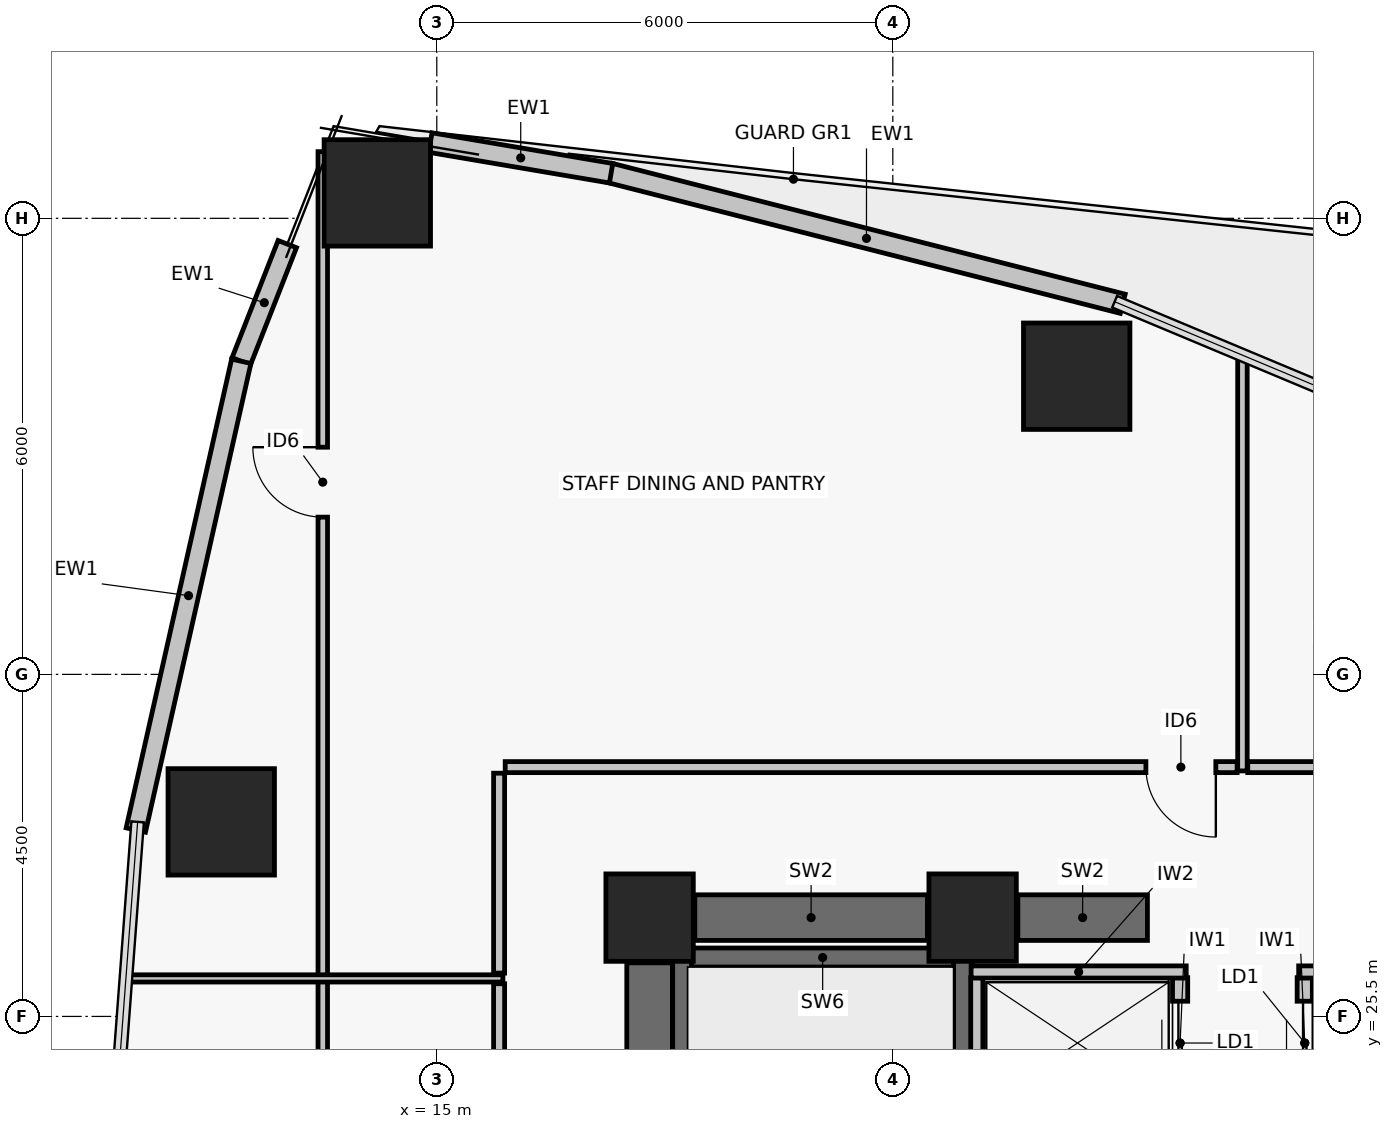
"""IFC4 building model, lengths in metres.
Left out: names, types, materials, properties, quantities, classifications, styles, units other than length and angle.
Written with IfcOpenShell. Run it as: python <this file> out.ifc"""

import sys

from ifc_helpers import new_model, si_unit, direction, frame, frame_2d, origin, origin_2d, place, context, subcontext, project, spatial, rectangle, hollow_rectangle, extrude, element, fill, save


model = new_model("IFC4")
c1 = context("Model", 3, precision=1e-05, world=origin(), true_north=direction((0.0, 1.0)))
c2 = subcontext(c1, "Body", "Model", "MODEL_VIEW")
j1 = project(units=[si_unit("LENGTHUNIT", "METRE"), si_unit("PLANEANGLEUNIT", "RADIAN")], contexts=[c1])
p1 = place(None, origin())
s1 = spatial("IfcSite", under=j1, at=p1, CompositionType="ELEMENT")
p2 = place(p1, origin())
s2 = spatial("IfcBuilding", under=s1, at=p2, CompositionType="ELEMENT")
p3 = place(p2, frame((0.0, 0.0, 68.52)))
s3 = spatial("IfcBuildingStorey", under=s2, at=p3, CompositionType="ELEMENT", Elevation=68.52)
for number, where, z_axis, x_axis in (
    (1, (17.8, 26.8, 0.0), (0.0, 0.0, 1.0), (1.0, 0.0, 0.0)),
    (2, (22.05, 26.8, 0.0), (0.0, 0.0, 1.0), (1.0, 0.0, 0.0)),
):
    element("IfcColumn", number, at=place(p3, frame(where, z_axis=z_axis, x_axis=x_axis)), inside=s3, PredefinedType="COLUMN", context=c2, shape_type="SweptSolid", body=[
        extrude(rectangle(XDim=1.15, YDim=1.15, at=origin_2d()), origin(), (0.0, 0.0, 1.0), 3.72),
    ])
p4 = place(p3, frame((18.395, 26.8, 0.0), z_axis=(0.0, 0.0, 1.0), x_axis=(1.0, 0.0, 0.0)))
e3 = element("IfcWall", 3, at=p4, inside=s3, PredefinedType="SHEAR", context=c2, shape_type="SweptSolid", body=[
    extrude(rectangle(XDim=3.06, YDim=0.6, at=frame_2d((1.53, 0.0))), origin(), (0.0, 0.0, 1.0), 3.47),
])
p5 = place(p3, frame((22.645, 26.8, 0.0), z_axis=(0.0, 0.0, 1.0), x_axis=(1.0, 0.0, 0.0)))
e4 = element("IfcWall", 4, at=p5, inside=s3, PredefinedType="SHEAR", context=c2, shape_type="SweptSolid", body=[
    extrude(rectangle(XDim=1.705, YDim=0.6, at=frame_2d((0.853, 0.0))), origin(), (0.0, 0.0, 1.0), 3.47),
])
p6 = place(p3, frame((17.8, 17.795, 0.0), z_axis=(0.0, 0.0, 1.0), x_axis=(0.0, 1.0, 0.0)))
e5 = element("IfcWall", 5, at=p6, inside=s3, PredefinedType="SHEAR", context=c2, shape_type="SweptSolid", body=[
    extrude(rectangle(XDim=8.41, YDim=0.6, at=frame_2d((4.205, 0.0))), origin(), (0.0, 0.0, 1.0), 3.47),
])
p7 = place(p3, frame((18.229, 17.6, 0.0), z_axis=(0.0, 0.0, 1.0), x_axis=(0.0, 1.0, 0.0)))
e6 = element("IfcWall", 6, at=p7, inside=s3, PredefinedType="SHEAR", context=c2, shape_type="SweptSolid", body=[
    extrude(rectangle(XDim=8.8, YDim=0.25, at=frame_2d((4.4, 0.0))), origin(), (0.0, 0.0, 1.0), 3.47),
])
p8 = place(p3, frame((21.925, 17.6, 0.0), z_axis=(0.0, 0.0, 1.0), x_axis=(0.0, 1.0, 0.0)))
e7 = element("IfcWall", 7, at=p8, inside=s3, PredefinedType="SHEAR", context=c2, shape_type="SweptSolid", body=[
    extrude(rectangle(XDim=8.8, YDim=0.25, at=frame_2d((4.4, 0.0))), origin(), (0.0, 0.0, 1.0), 3.47),
])
p9 = place(p8, frame((0.35, 0.0, 0.0)))
e8 = element("IfcOpeningElement", 8, at=p9, cuts=e7, PredefinedType="OPENING", context=c2, shape_type="SweptSolid", body=[
    extrude(rectangle(XDim=1.05, YDim=2.08, at=frame_2d((0.525, 1.04))), frame((0.0, 0.135, 0.0), z_axis=(0.0, -1.0, 0.0), x_axis=(1.0, 0.0, 0.0)), (0.0, 0.0, 1.0), 0.27),
])
p10 = place(p3, frame((18.354, 26.275, 0.0), z_axis=(0.0, 0.0, 1.0), x_axis=(1.0, 0.0, 0.0)))
e9 = element("IfcWall", 9, at=p10, inside=s3, PredefinedType="SHEAR", context=c2, shape_type="SweptSolid", body=[
    extrude(rectangle(XDim=3.446, YDim=0.25, at=frame_2d((1.723, 0.0))), origin(), (0.0, 0.0, 1.0), 3.47),
])
for number, where, z_axis, x_axis in (
    (10, (23.419, 33.923, 0.0), (0.0, 0.0, 1.0), (1.0, 0.0, 0.0)),
    (11, (14.218, 36.334, 0.0), (0.0, 0.0, 1.0), (1.0, 0.0, 0.0)),
    (12, (12.164, 28.06, 0.0), (0.0, 0.0, 1.0), (1.0, 0.0, 0.0)),
):
    element("IfcColumn", number, at=place(p3, frame(where, z_axis=z_axis, x_axis=x_axis)), inside=s3, PredefinedType="COLUMN", context=c2, shape_type="SweptSolid", body=[
        extrude(hollow_rectangle(XDim=1.4, YDim=1.4, WallThickness=0.055, at=origin_2d()), origin(), (0.0, 0.0, 1.0), 3.72),
    ])
p11 = place(p3, frame((17.282, 36.596, 0.0), z_axis=(0.0, 0.0, 1.0), x_axis=(0.968977974408, -0.247147092057, 0.0)))
e13 = element("IfcWall", 13, at=p11, inside=s3, PredefinedType="PARTITIONING", context=c2, shape_type="SweptSolid", body=[
    extrude(rectangle(XDim=6.959, YDim=0.26, at=frame_2d((3.479, 0.0))), origin(), (0.0, 0.0, 1.0), 3.47),
])
p12 = place(p3, frame((14.915, 36.997, 0.0), z_axis=(0.0, 0.0, 1.0), x_axis=(0.985905469923, -0.167303330437, 0.0)))
e14 = element("IfcWall", 14, at=p12, inside=s3, PredefinedType="PARTITIONING", context=c2, shape_type="SweptSolid", body=[
    extrude(rectangle(XDim=2.412, YDim=0.26, at=frame_2d((1.206, 0.0))), origin(), (0.0, 0.0, 1.0), 3.47),
])
p13 = place(p3, frame((12.427, 34.119, 0.0), z_axis=(0.0, 0.0, 1.0), x_axis=(0.365666052462, 0.930746119023, 0.0)))
e15 = element("IfcWall", 15, at=p13, inside=s3, PredefinedType="PARTITIONING", context=c2, shape_type="SweptSolid", body=[
    extrude(rectangle(XDim=1.656, YDim=0.26, at=frame_2d((0.828, 0.0))), origin(), (0.0, 0.0, 1.0), 3.47),
])
p14 = place(p3, frame((11.04, 27.952, 0.0), z_axis=(0.0, 0.0, 1.0), x_axis=(0.219502085231, 0.975612030768, 0.0)))
e16 = element("IfcWall", 16, at=p14, inside=s3, PredefinedType="PARTITIONING", context=c2, shape_type="SweptSolid", body=[
    extrude(rectangle(XDim=6.321, YDim=0.26, at=frame_2d((3.16, 0.0))), origin(), (0.0, 0.0, 1.0), 3.47),
])
p15 = place(p3, frame((24.78, 24.29, 0.0), z_axis=(0.0, 0.0, 1.0), x_axis=(0.0, 1.0, 0.0)))
e17 = element("IfcWall", 17, at=p15, inside=s3, PredefinedType="PARTITIONING", context=c2, shape_type="SweptSolid", body=[
    extrude(rectangle(XDim=1.72, YDim=0.2, at=frame_2d((0.86, 0.0))), origin(), (0.0, 0.0, 1.0), 3.47),
])
p16 = place(p15, frame((0.31, 0.0, 0.0)))
e18 = element("IfcOpeningElement", 18, at=p16, cuts=e17, PredefinedType="OPENING", context=c2, shape_type="SweptSolid", body=[
    extrude(rectangle(XDim=1.1, YDim=2.08, at=frame_2d((0.55, 1.04))), frame((0.0, 0.11, 0.0), z_axis=(0.0, -1.0, 0.0), x_axis=(1.0, 0.0, 0.0)), (0.0, 0.0, 1.0), 0.22),
])
p17 = place(p3, frame((26.42, 24.29, 0.0), z_axis=(0.0, 0.0, 1.0), x_axis=(0.0, 1.0, 0.0)))
e19 = element("IfcWall", 19, at=p17, inside=s3, PredefinedType="PARTITIONING", context=c2, shape_type="SweptSolid", body=[
    extrude(rectangle(XDim=1.72, YDim=0.2, at=frame_2d((0.86, 0.0))), origin(), (0.0, 0.0, 1.0), 3.47),
])
p18 = place(p17, frame((0.31, 0.0, 0.0)))
e20 = element("IfcOpeningElement", 20, at=p18, cuts=e19, PredefinedType="OPENING", context=c2, shape_type="SweptSolid", body=[
    extrude(rectangle(XDim=1.1, YDim=2.08, at=frame_2d((0.55, 1.04))), frame((0.0, 0.11, 0.0), z_axis=(0.0, -1.0, 0.0), x_axis=(1.0, 0.0, 0.0)), (0.0, 0.0, 1.0), 0.22),
])
p19 = place(p3, frame((22.105, 20.56, 0.0), z_axis=(0.0, 0.0, 1.0), x_axis=(0.0, 1.0, 0.0)))
e21 = element("IfcWall", 21, at=p19, inside=s3, PredefinedType="PARTITIONING", context=c2, shape_type="SweptSolid", body=[
    extrude(rectangle(XDim=5.45, YDim=0.16, at=frame_2d((2.725, 0.0))), origin(), (0.0, 0.0, 1.0), 3.47),
])
p20 = place(p3, frame((22.03, 26.085, 0.0), z_axis=(0.0, 0.0, 1.0), x_axis=(1.0, 0.0, 0.0)))
e22 = element("IfcWall", 22, at=p20, inside=s3, PredefinedType="PARTITIONING", context=c2, shape_type="SweptSolid", body=[
    extrude(rectangle(XDim=2.83, YDim=0.16, at=frame_2d((1.415, 0.0))), origin(), (0.0, 0.0, 1.0), 3.47),
])
p21 = place(p3, frame((26.34, 26.085, 0.0), z_axis=(0.0, 0.0, 1.0), x_axis=(1.0, 0.0, 0.0)))
e23 = element("IfcWall", 23, at=p21, inside=s3, PredefinedType="PARTITIONING", context=c2, shape_type="SweptSolid", body=[
    extrude(rectangle(XDim=2.83, YDim=0.16, at=frame_2d((1.415, 0.0))), origin(), (0.0, 0.0, 1.0), 3.47),
])
p22 = place(p3, frame((32.297, 28.78, 0.0), z_axis=(0.0, 0.0, 1.0), x_axis=(-1.0, 0.0, 0.0)))
e24 = element("IfcWall", 24, at=p22, inside=s3, PredefinedType="PARTITIONING", context=c2, shape_type="SweptSolid", body=[
    extrude(rectangle(XDim=6.627, YDim=0.145, at=frame_2d((3.314, 0.0))), origin(), (0.0, 0.0, 1.0), 3.47),
])
p23 = place(p3, frame((25.53, 28.78, 0.0), z_axis=(0.0, 0.0, 1.0), x_axis=(-1.0, 0.0, 0.0)))
e25 = element("IfcWall", 25, at=p23, inside=s3, PredefinedType="PARTITIONING", context=c2, shape_type="SweptSolid", body=[
    extrude(rectangle(XDim=9.63, YDim=0.145, at=frame_2d((4.815, 0.0))), origin(), (0.0, 0.0, 1.0), 2.2),
])
p24 = place(p23, frame((0.28, 0.0, 0.0)))
e26 = element("IfcOpeningElement", 26, at=p24, cuts=e25, PredefinedType="OPENING", context=c2, shape_type="SweptSolid", body=[
    extrude(rectangle(XDim=0.92, YDim=2.05, at=frame_2d((0.46, 1.025))), frame((0.0, 0.083, 0.0), z_axis=(0.0, -1.0, 0.0), x_axis=(1.0, 0.0, 0.0)), (0.0, 0.0, 1.0), 0.165),
])
p25 = place(p3, frame((15.82, 28.7, 0.0), z_axis=(0.0, 0.0, 1.0), x_axis=(0.0, -1.0, 0.0)))
e27 = element("IfcWall", 27, at=p25, inside=s3, PredefinedType="PARTITIONING", context=c2, shape_type="SweptSolid", body=[
    extrude(rectangle(XDim=2.63, YDim=0.145, at=frame_2d((1.315, 0.0))), origin(), (0.0, 0.0, 1.0), 2.2),
])
p26 = place(p3, frame((15.82, 25.93, 0.0), z_axis=(0.0, 0.0, 1.0), x_axis=(0.0, -1.0, 0.0)))
e28 = element("IfcWall", 28, at=p26, inside=s3, PredefinedType="PARTITIONING", context=c2, shape_type="SweptSolid", body=[
    extrude(rectangle(XDim=7.86, YDim=0.145, at=frame_2d((3.93, 0.0))), origin(), (0.0, 0.0, 1.0), 3.47),
])
p27 = place(p26, frame((3.455, 0.0, 0.0)))
e29 = element("IfcOpeningElement", 29, at=p27, cuts=e28, PredefinedType="OPENING", context=c2, shape_type="SweptSolid", body=[
    extrude(rectangle(XDim=0.95, YDim=2.06, at=frame_2d((0.475, 1.03))), frame((0.0, 0.083, 0.0), z_axis=(0.0, -1.0, 0.0), x_axis=(1.0, 0.0, 0.0)), (0.0, 0.0, 1.0), 0.165),
])
p28 = place(p3, frame((13.5, 7.123, 0.0), z_axis=(0.0, 0.0, 1.0), x_axis=(0.0, 1.0, 0.0)))
e30 = element("IfcWall", 30, at=p28, inside=s3, PredefinedType="PARTITIONING", context=c2, shape_type="SweptSolid", body=[
    extrude(rectangle(XDim=29.754, YDim=0.125, at=frame_2d((14.877, 0.0))), origin(), (0.0, 0.0, 1.0), 2.2),
])
p29 = place(p28, frame((3.888, 0.0, 0.0)))
e31 = element("IfcOpeningElement", 31, at=p29, cuts=e30, PredefinedType="OPENING", context=c2, shape_type="SweptSolid", body=[
    extrude(rectangle(XDim=0.92, YDim=2.05, at=frame_2d((0.46, 1.025))), frame((0.0, 0.073, 0.0), z_axis=(0.0, -1.0, 0.0), x_axis=(1.0, 0.0, 0.0)), (0.0, 0.0, 1.0), 0.145),
])
p30 = place(p28, frame((24.946, 0.0, 0.0)))
e32 = element("IfcOpeningElement", 32, at=p30, cuts=e30, PredefinedType="OPENING", context=c2, shape_type="SweptSolid", body=[
    extrude(rectangle(XDim=0.92, YDim=2.05, at=frame_2d((0.46, 1.025))), frame((0.0, 0.073, 0.0), z_axis=(0.0, -1.0, 0.0), x_axis=(1.0, 0.0, 0.0)), (0.0, 0.0, 1.0), 0.145),
])
p31 = place(p28, frame((14.417, 0.0, 0.0)))
e33 = element("IfcOpeningElement", 33, at=p31, cuts=e30, PredefinedType="OPENING", context=c2, shape_type="SweptSolid", body=[
    extrude(rectangle(XDim=0.92, YDim=2.05, at=frame_2d((0.46, 1.025))), frame((0.0, 0.073, 0.0), z_axis=(0.0, -1.0, 0.0), x_axis=(1.0, 0.0, 0.0)), (0.0, 0.0, 1.0), 0.145),
])
p32 = place(p3, frame((25.6, 28.73, 0.0), z_axis=(0.0, 0.0, 1.0), x_axis=(0.0, 1.0, 0.0)))
e34 = element("IfcWall", 34, at=p32, inside=s3, PredefinedType="PARTITIONING", context=c2, shape_type="SweptSolid", body=[
    extrude(rectangle(XDim=5.48, YDim=0.125, at=frame_2d((2.74, 0.0))), origin(), (0.0, 0.0, 1.0), 2.85),
])
p33 = place(p3, frame((10.9, 26.0, 0.0), z_axis=(0.0, 0.0, 1.0), x_axis=(1.0, 0.0, 0.0)))
e35 = element("IfcWall", 35, at=p33, inside=s3, PredefinedType="PARTITIONING", context=c2, shape_type="SweptSolid", body=[
    extrude(rectangle(XDim=4.97, YDim=0.095, at=frame_2d((2.485, 0.0))), origin(), (0.0, 0.0, 1.0), 2.85),
])
p34 = place(p16, origin())
e36 = element("IfcDoor", 36, at=p34, inside=s3, OperationType="DOUBLE_DOOR_SLIDING", PredefinedType="DOOR", context=c2, shape_type="SweptSolid", body=[
    extrude(rectangle(XDim=1.1, YDim=2.08, at=frame_2d((0.55, 1.04))), frame((0.0, 0.025, 0.0), z_axis=(0.0, -1.0, 0.0), x_axis=(1.0, 0.0, 0.0)), (0.0, 0.0, 1.0), 0.05),
])
fill(e18, e36)
p35 = place(p18, origin())
e37 = element("IfcDoor", 37, at=p35, inside=s3, OperationType="DOUBLE_DOOR_SLIDING", PredefinedType="DOOR", context=c2, shape_type="SweptSolid", body=[
    extrude(rectangle(XDim=1.1, YDim=2.08, at=frame_2d((0.55, 1.04))), frame((0.0, 0.025, 0.0), z_axis=(0.0, -1.0, 0.0), x_axis=(1.0, 0.0, 0.0)), (0.0, 0.0, 1.0), 0.05),
])
fill(e20, e37)
p36 = place(p24, origin())
e38 = element("IfcDoor", 38, at=p36, inside=s3, OperationType="SINGLE_SWING_LEFT", PredefinedType="DOOR", context=c2, shape_type="SweptSolid", body=[
    extrude(rectangle(XDim=0.92, YDim=2.05, at=frame_2d((0.46, 1.025))), frame((0.0, 0.025, 0.0), z_axis=(0.0, -1.0, 0.0), x_axis=(1.0, 0.0, 0.0)), (0.0, 0.0, 1.0), 0.05),
])
fill(e26, e38)
p37 = place(p30, origin())
e39 = element("IfcDoor", 39, at=p37, inside=s3, OperationType="SINGLE_SWING_RIGHT", PredefinedType="DOOR", context=c2, shape_type="SweptSolid", body=[
    extrude(rectangle(XDim=0.92, YDim=2.05, at=frame_2d((0.46, 1.025))), frame((0.0, 0.025, 0.0), z_axis=(0.0, -1.0, 0.0), x_axis=(1.0, 0.0, 0.0)), (0.0, 0.0, 1.0), 0.05),
])
fill(e32, e39)
save(model, sys.argv[1])
